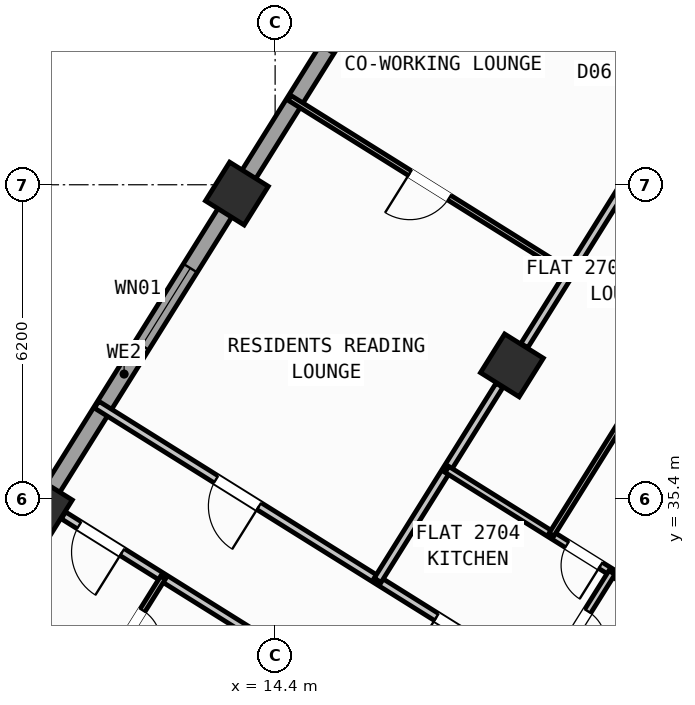
"""IFC4 building model, lengths in metres.
Left out: names, types, materials, properties, quantities, classifications, styles, units other than length and angle.
Written with IfcOpenShell. Run it as: python <this file> out.ifc"""

import sys

from ifc_helpers import new_model, si_unit, direction, frame, frame_2d, origin, origin_2d, place, context, subcontext, project, spatial, rectangle, hollow_rectangle, extrude, source, transform, mapped, element, fill, save


model = new_model("IFC4")
c1 = context("Model", 3, precision=1e-05, world=origin(), true_north=direction((0.0, 1.0)))
c2 = subcontext(c1, "Body", "Model", "MODEL_VIEW")
j1 = project(units=[si_unit("LENGTHUNIT", "METRE"), si_unit("PLANEANGLEUNIT", "RADIAN")], contexts=[c1])
p1 = place(None, origin())
s1 = spatial("IfcSite", under=j1, at=p1, CompositionType="ELEMENT")
p2 = place(p1, origin())
s2 = spatial("IfcBuilding", under=s1, at=p2, CompositionType="ELEMENT")
p3 = place(p2, frame((0.0, 0.0, 108.9)))
s3 = spatial("IfcBuildingStorey", under=s2, at=p3, CompositionType="ELEMENT", Elevation=108.9)
m1 = source(origin(), c2, "Body", "SweptSolid", [
    extrude(hollow_rectangle(XDim=0.9, YDim=0.9, WallThickness=0.036, at=origin_2d()), origin(), (0.0, 0.0, 1.0), 3.6),
])
for number, where, z_axis, x_axis in (
    (1, (19.073, 38.034, 0.0), (0.0, 0.0, 1.0), (-0.848, 0.53, 0.0)),
    (2, (13.646, 41.426, 0.0), (0.0, 0.0, 1.0), (-0.848, 0.53, 0.0)),
    (3, (9.777, 35.235, 0.0), (0.0, 0.0, 1.0), (-0.848, 0.53, 0.0)),
):
    element("IfcColumn", number, at=place(p3, frame(where, z_axis=z_axis, x_axis=x_axis)), inside=s3, PredefinedType="COLUMN", context=c2, shape_type="MappedRepresentation", body=[
        mapped(m1, transform((0.0, 0.0, 0.0), scale=1.0)),
    ])
p4 = place(p3, frame((5.7, 28.71, 0.0), z_axis=(0.0, 0.0, 1.0), x_axis=(0.529923711467, 0.8480453172, 0.0)))
e4 = element("IfcWall", 4, at=p4, inside=s3, PredefinedType="STANDARD", context=c2, shape_type="SweptSolid", body=[
    extrude(rectangle(XDim=21.587, YDim=0.32, at=frame_2d((10.794, 0.0))), origin(), (0.0, 0.0, 1.0), 2.775),
])
p5 = place(p4, frame((1.984, 0.0, 0.8)))
e5 = element("IfcOpeningElement", 5, at=p5, cuts=e4, PredefinedType="OPENING", context=c2, shape_type="SweptSolid", body=[
    extrude(rectangle(XDim=2.1, YDim=1.55, at=frame_2d((1.05, 0.775))), frame((0.0, 0.17, 0.0), z_axis=(0.0, -1.0, 0.0), x_axis=(1.0, 0.0, 0.0)), (0.0, 0.0, 1.0), 0.34),
])
p6 = place(p4, frame((11.459, 0.0, 0.85)))
e6 = element("IfcOpeningElement", 6, at=p6, cuts=e4, PredefinedType="OPENING", context=c2, shape_type="SweptSolid", body=[
    extrude(rectangle(XDim=1.8, YDim=1.5, at=frame_2d((0.9, 0.75))), frame((0.0, 0.17, 0.0), z_axis=(0.0, -1.0, 0.0), x_axis=(1.0, 0.0, 0.0)), (0.0, 0.0, 1.0), 0.34),
])
p7 = place(p4, frame((18.335, 0.0, 0.85)))
e7 = element("IfcOpeningElement", 7, at=p7, cuts=e4, PredefinedType="OPENING", context=c2, shape_type="SweptSolid", body=[
    extrude(rectangle(XDim=1.5, YDim=1.5, at=frame_2d((0.75, 0.75))), frame((0.0, 0.17, 0.0), z_axis=(0.0, -1.0, 0.0), x_axis=(1.0, 0.0, 0.0)), (0.0, 0.0, 1.0), 0.34),
])
p8 = place(p3, frame((17.424, 47.083, 0.0), z_axis=(0.0, 0.0, 1.0), x_axis=(0.848049927979, -0.529916332693, 0.0)))
e8 = element("IfcWall", 8, at=p8, inside=s3, PredefinedType="STANDARD", context=c2, shape_type="SweptSolid", body=[
    extrude(rectangle(XDim=29.223, YDim=0.32, at=frame_2d((14.612, 0.0))), origin(), (0.0, 0.0, 1.0), 3.35),
])
p9 = place(p8, frame((3.77, 0.0, 0.0)))
e9 = element("IfcOpeningElement", 9, at=p9, cuts=e8, PredefinedType="OPENING", context=c2, shape_type="SweptSolid", body=[
    extrude(rectangle(XDim=1.05, YDim=2.15, at=frame_2d((0.525, 1.075))), frame((0.0, 0.17, 0.0), z_axis=(0.0, -1.0, 0.0), x_axis=(1.0, 0.0, 0.0)), (0.0, 0.0, 1.0), 0.34),
])
p10 = place(p8, frame((0.9, 0.0, 0.8)))
e10 = element("IfcOpeningElement", 10, at=p10, cuts=e8, PredefinedType="OPENING", context=c2, shape_type="SweptSolid", body=[
    extrude(rectangle(XDim=2.1, YDim=1.55, at=frame_2d((1.05, 0.775))), frame((0.0, 0.17, 0.0), z_axis=(0.0, -1.0, 0.0), x_axis=(1.0, 0.0, 0.0)), (0.0, 0.0, 1.0), 0.34),
])
p11 = place(p8, frame((6.972, 0.0, 1.0)))
e11 = element("IfcOpeningElement", 11, at=p11, cuts=e8, PredefinedType="OPENING", context=c2, shape_type="SweptSolid", body=[
    extrude(rectangle(XDim=0.9, YDim=1.25, at=frame_2d((0.45, 0.625))), frame((0.0, 0.17, 0.0), z_axis=(0.0, -1.0, 0.0), x_axis=(1.0, 0.0, 0.0)), (0.0, 0.0, 1.0), 0.34),
])
p12 = place(p8, frame((9.847, 0.0, 0.85)))
e12 = element("IfcOpeningElement", 12, at=p12, cuts=e8, PredefinedType="OPENING", context=c2, shape_type="SweptSolid", body=[
    extrude(rectangle(XDim=1.5, YDim=1.5, at=frame_2d((0.75, 0.75))), frame((0.0, 0.17, 0.0), z_axis=(0.0, -1.0, 0.0), x_axis=(1.0, 0.0, 0.0)), (0.0, 0.0, 1.0), 0.34),
])
p13 = place(p8, frame((13.889, 0.0, 0.95)))
e13 = element("IfcOpeningElement", 13, at=p13, cuts=e8, PredefinedType="OPENING", context=c2, shape_type="SweptSolid", body=[
    extrude(rectangle(XDim=1.2, YDim=1.4, at=frame_2d((0.6, 0.7))), frame((0.0, 0.17, 0.0), z_axis=(0.0, -1.0, 0.0), x_axis=(1.0, 0.0, 0.0)), (0.0, 0.0, 1.0), 0.34),
])
p14 = place(p8, frame((17.254, 0.0, 1.0)))
e14 = element("IfcOpeningElement", 14, at=p14, cuts=e8, PredefinedType="OPENING", context=c2, shape_type="SweptSolid", body=[
    extrude(rectangle(XDim=0.9, YDim=1.25, at=frame_2d((0.45, 0.625))), frame((0.0, 0.17, 0.0), z_axis=(0.0, -1.0, 0.0), x_axis=(1.0, 0.0, 0.0)), (0.0, 0.0, 1.0), 0.34),
])
p15 = place(p8, frame((20.764, 0.0, 0.8)))
e15 = element("IfcOpeningElement", 15, at=p15, cuts=e8, PredefinedType="OPENING", context=c2, shape_type="SweptSolid", body=[
    extrude(rectangle(XDim=2.1, YDim=1.55, at=frame_2d((1.05, 0.775))), frame((0.0, 0.17, 0.0), z_axis=(0.0, -1.0, 0.0), x_axis=(1.0, 0.0, 0.0)), (0.0, 0.0, 1.0), 0.34),
])
p16 = place(p8, frame((25.403, 0.0, 0.8)))
e16 = element("IfcOpeningElement", 16, at=p16, cuts=e8, PredefinedType="OPENING", context=c2, shape_type="SweptSolid", body=[
    extrude(rectangle(XDim=2.1, YDim=1.55, at=frame_2d((1.05, 0.775))), frame((0.0, 0.17, 0.0), z_axis=(0.0, -1.0, 0.0), x_axis=(1.0, 0.0, 0.0)), (0.0, 0.0, 1.0), 0.34),
])
p17 = place(p3, frame((25.065, 28.394, 0.0), z_axis=(0.0, 0.0, 1.0), x_axis=(-0.848048310262, 0.529918921593, 0.0)))
e17 = element("IfcWall", 17, at=p17, inside=s3, PredefinedType="PARTITIONING", context=c2, shape_type="SweptSolid", body=[
    extrude(rectangle(XDim=16.73, YDim=0.16, at=frame_2d((8.365, 0.0))), origin(), (0.0, 0.0, 1.0), 3.34),
])
p18 = place(p17, frame((2.22, 0.0, 0.0)))
e18 = element("IfcOpeningElement", 18, at=p18, cuts=e17, PredefinedType="OPENING", context=c2, shape_type="SweptSolid", body=[
    extrude(rectangle(XDim=0.86, YDim=2.05, at=frame_2d((0.43, 1.025))), frame((0.0, 0.09, 0.0), z_axis=(0.0, -1.0, 0.0), x_axis=(1.0, 0.0, 0.0)), (0.0, 0.0, 1.0), 0.18),
])
p19 = place(p17, frame((7.82, 0.0, 0.0)))
e19 = element("IfcOpeningElement", 19, at=p19, cuts=e17, PredefinedType="OPENING", context=c2, shape_type="SweptSolid", body=[
    extrude(rectangle(XDim=1.0, YDim=2.1, at=frame_2d((0.5, 1.05))), frame((0.0, 0.09, 0.0), z_axis=(0.0, -1.0, 0.0), x_axis=(1.0, 0.0, 0.0)), (0.0, 0.0, 1.0), 0.18),
])
p20 = place(p17, frame((12.95, 0.0, 0.0)))
e20 = element("IfcOpeningElement", 20, at=p20, cuts=e17, PredefinedType="OPENING", context=c2, shape_type="SweptSolid", body=[
    extrude(rectangle(XDim=1.0, YDim=2.1, at=frame_2d((0.5, 1.05))), frame((0.0, 0.09, 0.0), z_axis=(0.0, -1.0, 0.0), x_axis=(1.0, 0.0, 0.0)), (0.0, 0.0, 1.0), 0.18),
])
p21 = place(p3, frame((14.866, 32.173, 0.0), z_axis=(0.0, 0.0, 1.0), x_axis=(-0.848053401719, 0.529910773464, 0.0)))
e21 = element("IfcWall", 21, at=p21, inside=s3, PredefinedType="PARTITIONING", context=c2, shape_type="SweptSolid", body=[
    extrude(rectangle(XDim=5.476, YDim=0.16, at=frame_2d((2.738, 0.0))), origin(), (0.0, 0.0, 1.0), 2.775),
])
p22 = place(p21, frame((4.108, 0.0, 0.0)))
e22 = element("IfcOpeningElement", 22, at=p22, cuts=e21, PredefinedType="OPENING", context=c2, shape_type="SweptSolid", body=[
    extrude(rectangle(XDim=1.0, YDim=2.1, at=frame_2d((0.5, 1.05))), frame((0.0, 0.09, 0.0), z_axis=(0.0, -1.0, 0.0), x_axis=(1.0, 0.0, 0.0)), (0.0, 0.0, 1.0), 0.18),
])
p23 = place(p3, frame((12.188, 33.847, 0.0), z_axis=(0.0, 0.0, 1.0), x_axis=(-0.529917860021, -0.848048973604, 0.0)))
e23 = element("IfcWall", 23, at=p23, inside=s3, PredefinedType="PARTITIONING", context=c2, shape_type="SweptSolid", body=[
    extrude(rectangle(XDim=8.12, YDim=0.11, at=frame_2d((4.06, 0.0))), origin(), (0.0, 0.0, 1.0), 3.34),
])
p24 = place(p23, frame((0.76, 0.0, 0.0)))
e24 = element("IfcOpeningElement", 24, at=p24, cuts=e23, PredefinedType="OPENING", context=c2, shape_type="SweptSolid", body=[
    extrude(rectangle(XDim=0.78, YDim=2.05, at=frame_2d((0.39, 1.025))), frame((0.0, 0.065, 0.0), z_axis=(0.0, -1.0, 0.0), x_axis=(1.0, 0.0, 0.0)), (0.0, 0.0, 1.0), 0.13),
])
p25 = place(p23, frame((4.8, 0.0, 0.0)))
e25 = element("IfcOpeningElement", 25, at=p25, cuts=e23, PredefinedType="OPENING", context=c2, shape_type="SweptSolid", body=[
    extrude(rectangle(XDim=0.92, YDim=2.08, at=frame_2d((0.46, 1.04))), frame((0.0, 0.065, 0.0), z_axis=(0.0, -1.0, 0.0), x_axis=(1.0, 0.0, 0.0)), (0.0, 0.0, 1.0), 0.13),
])
p26 = place(p3, frame((10.916, 31.811, 0.0), z_axis=(0.0, 0.0, 1.0), x_axis=(-0.84802195137, 0.529961102341, 0.0)))
e26 = element("IfcWall", 26, at=p26, inside=s3, PredefinedType="PLUMBINGWALL", context=c2, shape_type="SweptSolid", body=[
    extrude(rectangle(XDim=2.9, YDim=0.14, at=frame_2d((1.45, 0.0))), origin(), (0.0, 0.0, 1.0), 3.34),
])
p27 = place(p26, frame((0.99, 0.0, 0.0)))
e27 = element("IfcOpeningElement", 27, at=p27, cuts=e26, PredefinedType="OPENING", context=c2, shape_type="SweptSolid", body=[
    extrude(rectangle(XDim=0.92, YDim=2.08, at=frame_2d((0.46, 1.04))), frame((0.0, 0.08, 0.0), z_axis=(0.0, -1.0, 0.0), x_axis=(1.0, 0.0, 0.0)), (0.0, 0.0, 1.0), 0.16),
])
p28 = place(p3, frame((22.18, 43.006, 0.0), z_axis=(0.0, 0.0, 1.0), x_axis=(-0.529913610495, -0.848051628978, 0.0)))
e28 = element("IfcWall", 28, at=p28, inside=s3, PredefinedType="PARTITIONING", context=c2, shape_type="SweptSolid", body=[
    extrude(rectangle(XDim=5.401, YDim=0.16, at=frame_2d((2.7, 0.0))), origin(), (0.0, 0.0, 1.0), 2.775),
])
p29 = place(p3, frame((18.828, 37.643, 0.0), z_axis=(0.0, 0.0, 1.0), x_axis=(-0.529926399231, -0.848043637673, 0.0)))
e29 = element("IfcWall", 29, at=p29, inside=s3, PredefinedType="PARTITIONING", context=c2, shape_type="SweptSolid", body=[
    extrude(rectangle(XDim=4.538, YDim=0.16, at=frame_2d((2.269, 0.0))), origin(), (0.0, 0.0, 1.0), 2.775),
])
p30 = place(p3, frame((23.218, 32.591, 0.0), z_axis=(0.0, 0.0, 1.0), x_axis=(-0.848056163074, 0.529906354247, 0.0)))
e30 = element("IfcWall", 30, at=p30, inside=s3, PredefinedType="PLUMBINGWALL", context=c2, shape_type="SweptSolid", body=[
    extrude(rectangle(XDim=6.4, YDim=0.14, at=frame_2d((3.2, 0.0))), origin(), (0.0, 0.0, 1.0), 3.34),
])
p31 = place(p30, frame((2.824, 0.0, 0.0)))
e31 = element("IfcOpeningElement", 31, at=p31, cuts=e30, PredefinedType="OPENING", context=c2, shape_type="SweptSolid", body=[
    extrude(rectangle(XDim=0.78, YDim=2.05, at=frame_2d((0.39, 1.025))), frame((0.0, 0.08, 0.0), z_axis=(0.0, -1.0, 0.0), x_axis=(1.0, 0.0, 0.0)), (0.0, 0.0, 1.0), 0.16),
])
p32 = place(p3, frame((21.047, 33.947, 0.0), z_axis=(0.0, 0.0, 1.0), x_axis=(-0.529913878929, -0.848051461244, 0.0)))
e32 = element("IfcWall", 32, at=p32, inside=s3, PredefinedType="PLUMBINGWALL", context=c2, shape_type="SweptSolid", body=[
    extrude(rectangle(XDim=2.58, YDim=0.14, at=frame_2d((1.29, 0.0))), origin(), (0.0, 0.0, 1.0), 3.34),
])
p33 = place(p32, frame((0.9, 0.0, 0.0)))
e33 = element("IfcOpeningElement", 33, at=p33, cuts=e32, PredefinedType="OPENING", context=c2, shape_type="SweptSolid", body=[
    extrude(rectangle(XDim=0.78, YDim=2.05, at=frame_2d((0.39, 1.025))), frame((0.0, 0.08, 0.0), z_axis=(0.0, -1.0, 0.0), x_axis=(1.0, 0.0, 0.0)), (0.0, 0.0, 1.0), 0.16),
])
p34 = place(p3, frame((24.802, 42.614, 0.0), z_axis=(0.0, 0.0, 1.0), x_axis=(-0.529926099889, -0.848043824727, 0.0)))
e34 = element("IfcWall", 34, at=p34, inside=s3, PredefinedType="PARTITIONING", context=c2, shape_type="SweptSolid", body=[
    extrude(rectangle(XDim=9.34, YDim=0.11, at=frame_2d((4.67, 0.0))), origin(), (0.0, 0.0, 1.0), 3.34),
])
p35 = place(p34, frame((0.47, 0.0, 0.0)))
e35 = element("IfcOpeningElement", 35, at=p35, cuts=e34, PredefinedType="OPENING", context=c2, shape_type="SweptSolid", body=[
    extrude(rectangle(XDim=0.92, YDim=2.08, at=frame_2d((0.46, 1.04))), frame((0.0, 0.065, 0.0), z_axis=(0.0, -1.0, 0.0), x_axis=(1.0, 0.0, 0.0)), (0.0, 0.0, 1.0), 0.13),
])
p36 = place(p3, frame((20.213, 39.859, 0.0), z_axis=(0.0, 0.0, 1.0), x_axis=(-0.848048787466, 0.529918157905, 0.0)))
e36 = element("IfcWall", 36, at=p36, inside=s3, PredefinedType="PARTITIONING", context=c2, shape_type="SweptSolid", body=[
    extrude(rectangle(XDim=6.52, YDim=0.11, at=frame_2d((3.26, 0.0))), origin(), (0.0, 0.0, 1.0), 3.34),
])
p37 = place(p36, frame((2.8, 0.0, 0.0)))
e37 = element("IfcOpeningElement", 37, at=p37, cuts=e36, PredefinedType="OPENING", context=c2, shape_type="SweptSolid", body=[
    extrude(rectangle(XDim=0.92, YDim=2.08, at=frame_2d((0.46, 1.04))), frame((0.0, 0.065, 0.0), z_axis=(0.0, -1.0, 0.0), x_axis=(1.0, 0.0, 0.0)), (0.0, 0.0, 1.0), 0.13),
])
m2 = source(origin(), c2, "Body", "SweptSolid", [
    extrude(rectangle(XDim=1.8, YDim=1.5, at=frame_2d((0.9, 0.75))), frame((0.0, 0.03, 0.0), z_axis=(0.0, -1.0, 0.0), x_axis=(1.0, 0.0, 0.0)), (0.0, 0.0, 1.0), 0.06),
])
p38 = place(p6, origin())
e38 = element("IfcWindow", 38, at=p38, inside=s3, PartitioningType="SINGLE_PANEL", PredefinedType="WINDOW", context=c2, shape_type="MappedRepresentation", body=[
    mapped(m2, transform((0.0, 0.0, 0.0), scale=1.0)),
])
fill(e6, e38)
m3 = source(origin(), c2, "Body", "SweptSolid", [
    extrude(rectangle(XDim=1.0, YDim=2.1, at=frame_2d((0.5, 1.05))), frame((0.0, 0.025, 0.0), z_axis=(0.0, -1.0, 0.0), x_axis=(1.0, 0.0, 0.0)), (0.0, 0.0, 1.0), 0.05),
])
p39 = place(p22, origin())
e39 = element("IfcDoor", 39, at=p39, inside=s3, OperationType="SINGLE_SWING_LEFT", PredefinedType="DOOR", context=c2, shape_type="MappedRepresentation", body=[
    mapped(m3, transform((0.0, 0.0, 0.0), scale=1.0)),
])
fill(e22, e39)
m4 = source(origin(), c2, "Body", "SweptSolid", [
    extrude(rectangle(XDim=0.78, YDim=2.05, at=frame_2d((0.39, 1.025))), frame((0.0, 0.025, 0.0), z_axis=(0.0, -1.0, 0.0), x_axis=(1.0, 0.0, 0.0)), (0.0, 0.0, 1.0), 0.05),
])
p40 = place(p24, origin())
e40 = element("IfcDoor", 40, at=p40, inside=s3, OperationType="SINGLE_SWING_RIGHT", PredefinedType="DOOR", context=c2, shape_type="MappedRepresentation", body=[
    mapped(m4, transform((0.0, 0.0, 0.0), scale=1.0)),
])
fill(e24, e40)
p41 = place(p19, origin())
e41 = element("IfcDoor", 41, at=p41, inside=s3, OperationType="SINGLE_SWING_RIGHT", PredefinedType="DOOR", context=c2, shape_type="MappedRepresentation", body=[
    mapped(m3, transform((0.0, 0.0, 0.0), scale=1.0)),
])
fill(e19, e41)
p42 = place(p31, origin())
e42 = element("IfcDoor", 42, at=p42, inside=s3, OperationType="SINGLE_SWING_LEFT", PredefinedType="DOOR", context=c2, shape_type="MappedRepresentation", body=[
    mapped(m4, transform((0.0, 0.0, 0.0), scale=1.0)),
])
fill(e31, e42)
p43 = place(p33, origin())
e43 = element("IfcDoor", 43, at=p43, inside=s3, OperationType="SINGLE_SWING_RIGHT", PredefinedType="DOOR", context=c2, shape_type="MappedRepresentation", body=[
    mapped(m4, transform((0.0, 0.0, 0.0), scale=1.0)),
])
fill(e33, e43)
p44 = place(p20, origin())
e44 = element("IfcDoor", 44, at=p44, inside=s3, OperationType="SINGLE_SWING_LEFT", PredefinedType="DOOR", context=c2, shape_type="MappedRepresentation", body=[
    mapped(m3, transform((0.0, 0.0, 0.0), scale=1.0)),
])
fill(e20, e44)
m5 = source(origin(), c2, "Body", "SweptSolid", [
    extrude(rectangle(XDim=0.92, YDim=2.08, at=frame_2d((0.46, 1.04))), frame((0.0, 0.025, 0.0), z_axis=(0.0, -1.0, 0.0), x_axis=(1.0, 0.0, 0.0)), (0.0, 0.0, 1.0), 0.05),
])
p45 = place(p37, origin())
e45 = element("IfcDoor", 45, at=p45, inside=s3, OperationType="SINGLE_SWING_RIGHT", PredefinedType="DOOR", context=c2, shape_type="MappedRepresentation", body=[
    mapped(m5, transform((0.0, 0.0, 0.0), scale=1.0)),
])
fill(e37, e45)
save(model, sys.argv[1])
